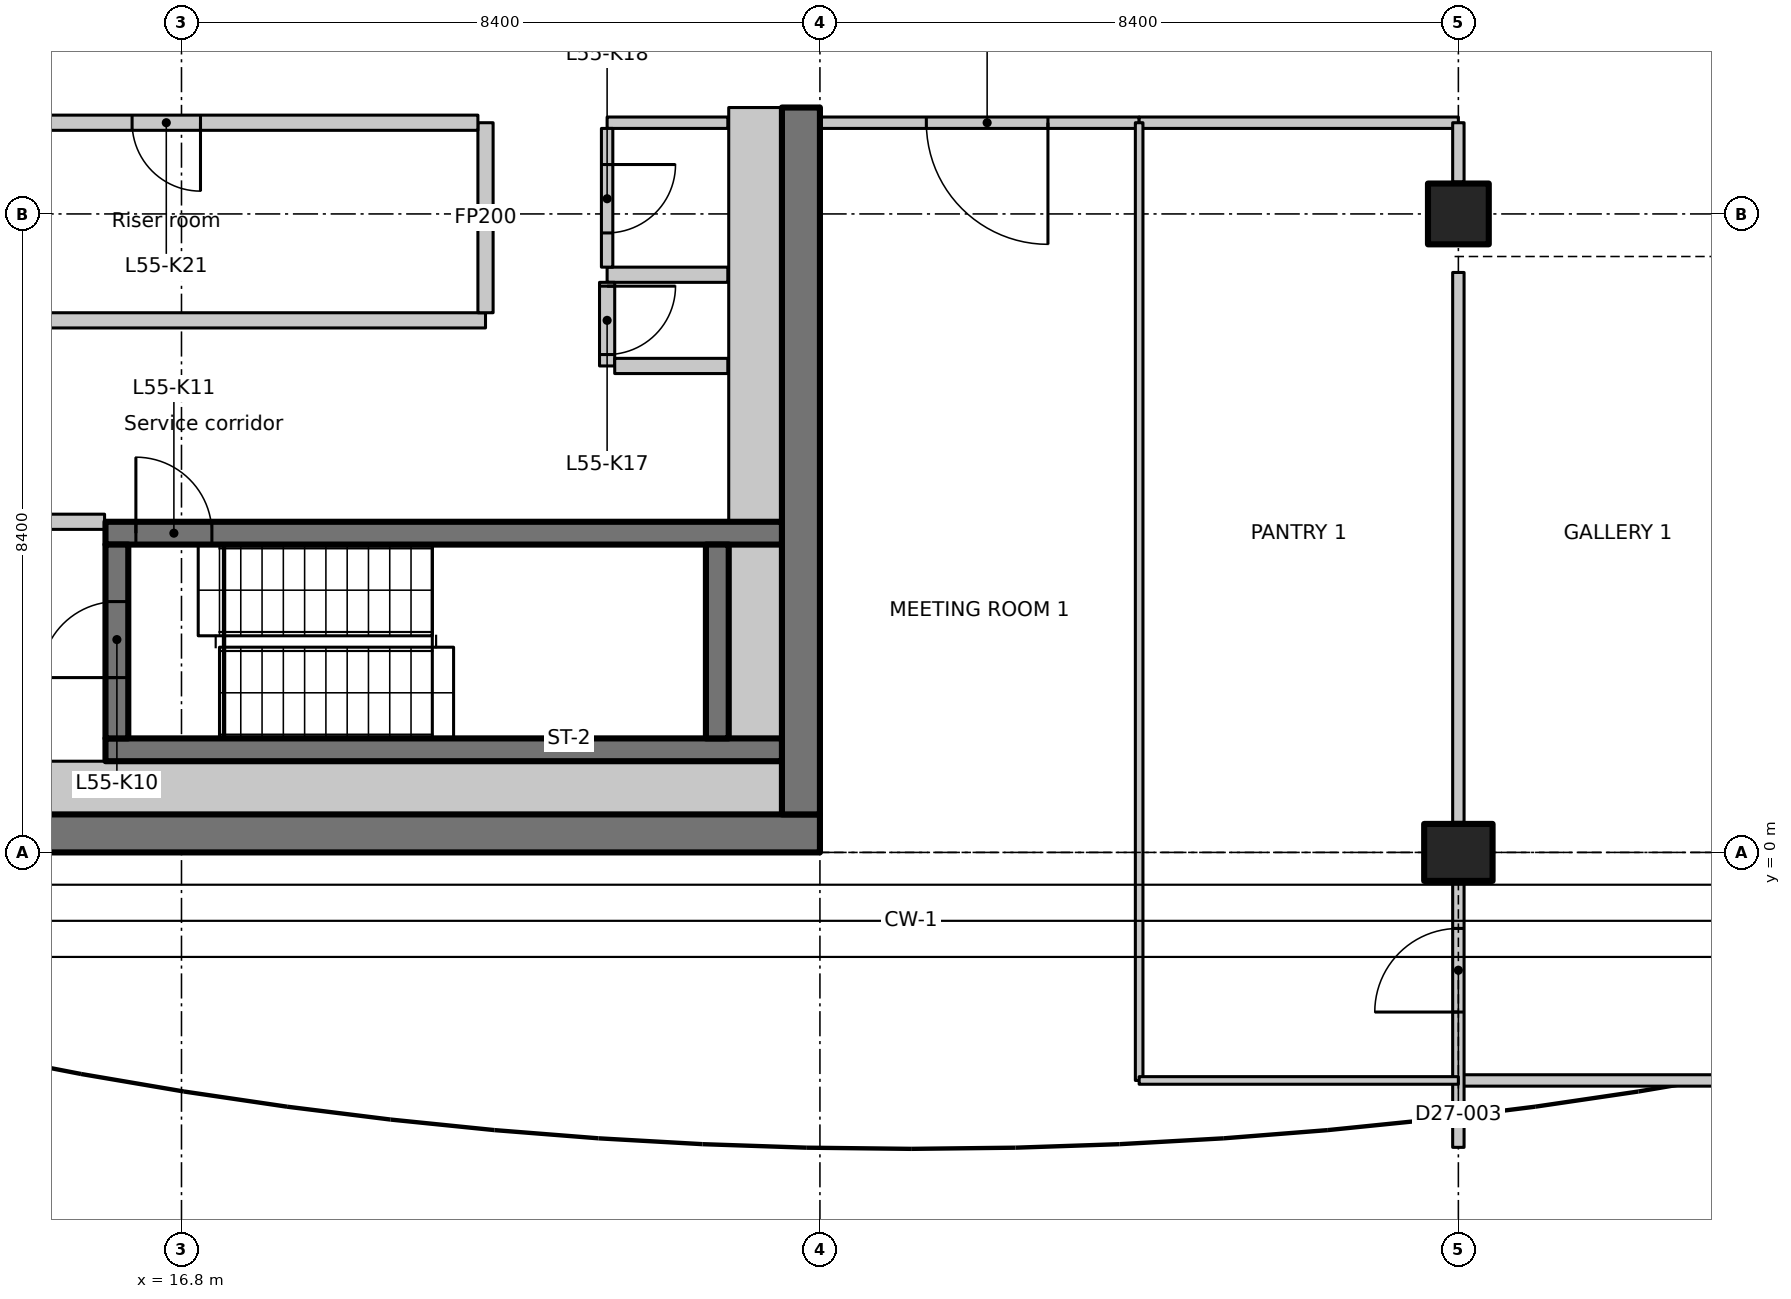
"""IFC4 building model, lengths in metres.
Left out: names, types, materials, properties, quantities, classifications, styles, units other than length and angle.
Written with IfcOpenShell. Run it as: python <this file> out.ifc"""

import sys

from ifc_helpers import new_model, si_unit, direction, frame, frame_2d, origin, origin_2d, place, context, subcontext, project, spatial, polyline, rectangle, outline, extrude, element, fill, save


model = new_model("IFC4")
c1 = context("Model", 3, precision=1e-05, world=origin(), true_north=direction((0.0, 1.0)))
c2 = subcontext(c1, "Body", "Model", "MODEL_VIEW")
j1 = project(units=[si_unit("LENGTHUNIT", "METRE"), si_unit("PLANEANGLEUNIT", "RADIAN")], contexts=[c1])
p1 = place(None, origin())
s1 = spatial("IfcSite", under=j1, at=p1, CompositionType="ELEMENT")
p2 = place(p1, origin())
s2 = spatial("IfcBuilding", under=s1, at=p2, CompositionType="ELEMENT")
p3 = place(p2, frame((0.0, 0.0, 219.3)))
s3 = spatial("IfcBuildingStorey", under=s2, at=p3, CompositionType="ELEMENT", Elevation=219.3)
p4 = place(p3, frame((33.6, 0.0, 0.0), z_axis=(0.0, 0.0, 1.0), x_axis=(0.0, 1.0, 0.0)))
e1 = element("IfcColumn", 1, at=p4, inside=s3, PredefinedType="COLUMN", context=c2, shape_type="SweptSolid", body=[
    extrude(rectangle(XDim=0.75, YDim=0.9, at=origin_2d()), origin(), (0.0, 0.0, 1.0), 3.35),
])
p5 = place(p3, frame((33.6, 8.4, 0.0), z_axis=(0.0, 0.0, 1.0), x_axis=(1.0, 0.0, 0.0)))
e2 = element("IfcColumn", 2, at=p5, inside=s3, PredefinedType="COLUMN", context=c2, shape_type="SweptSolid", body=[
    extrude(rectangle(XDim=0.8, YDim=0.8, at=origin_2d()), origin(), (0.0, 0.0, 1.0), 3.35),
])
p6 = place(p3, frame((7.436, 0.25, 0.0), z_axis=(0.0, 0.0, 1.0), x_axis=(1.0, 0.0, 0.0)))
e3 = element("IfcWall", 3, at=p6, inside=s3, PredefinedType="SHEAR", context=c2, shape_type="SweptSolid", body=[
    extrude(rectangle(XDim=17.764, YDim=0.5, at=frame_2d((8.882, 0.0))), origin(), (0.0, 0.0, 1.0), 3.35),
])
p7 = place(p3, frame((24.95, 0.5, 0.0), z_axis=(0.0, 0.0, 1.0), x_axis=(0.0, 1.0, 0.0)))
e4 = element("IfcWall", 4, at=p7, inside=s3, PredefinedType="SHEAR", context=c2, shape_type="SweptSolid", body=[
    extrude(rectangle(XDim=9.3, YDim=0.5, at=frame_2d((4.65, 0.0))), origin(), (0.0, 0.0, 1.0), 3.35),
])
p8 = place(p3, frame((15.8, 1.35, 0.0), z_axis=(0.0, 0.0, 1.0), x_axis=(1.0, 0.0, 0.0)))
e5 = element("IfcWall", 5, at=p8, inside=s3, PredefinedType="SHEAR", context=c2, shape_type="SweptSolid", body=[
    extrude(rectangle(XDim=8.9, YDim=0.3, at=frame_2d((4.45, 0.0))), origin(), (0.0, 0.0, 1.0), 3.35),
])
p9 = place(p3, frame((15.8, 4.2, 0.0), z_axis=(0.0, 0.0, 1.0), x_axis=(1.0, 0.0, 0.0)))
e6 = element("IfcWall", 6, at=p9, inside=s3, PredefinedType="SHEAR", context=c2, shape_type="SweptSolid", body=[
    extrude(rectangle(XDim=8.9, YDim=0.3, at=frame_2d((4.45, 0.0))), origin(), (0.0, 0.0, 1.0), 3.35),
])
p10 = place(p9, frame((0.4, 0.0, 0.0)))
e7 = element("IfcOpeningElement", 7, at=p10, cuts=e6, PredefinedType="OPENING", context=c2, shape_type="SweptSolid", body=[
    extrude(rectangle(XDim=1.0, YDim=2.1, at=frame_2d((0.5, 1.05))), frame((0.0, 0.16, 0.0), z_axis=(0.0, -1.0, 0.0), x_axis=(1.0, 0.0, 0.0)), (0.0, 0.0, 1.0), 0.32),
])
p11 = place(p3, frame((15.95, 1.5, 0.0), z_axis=(0.0, 0.0, 1.0), x_axis=(0.0, 1.0, 0.0)))
e8 = element("IfcWall", 8, at=p11, inside=s3, PredefinedType="SHEAR", context=c2, shape_type="SweptSolid", body=[
    extrude(rectangle(XDim=2.55, YDim=0.3, at=frame_2d((1.275, 0.0))), origin(), (0.0, 0.0, 1.0), 3.35),
])
p12 = place(p11, frame((0.8, 0.0, 0.0)))
e9 = element("IfcOpeningElement", 9, at=p12, cuts=e8, PredefinedType="OPENING", context=c2, shape_type="SweptSolid", body=[
    extrude(rectangle(XDim=1.0, YDim=2.1, at=frame_2d((0.5, 1.05))), frame((0.0, 0.16, 0.0), z_axis=(0.0, -1.0, 0.0), x_axis=(1.0, 0.0, 0.0)), (0.0, 0.0, 1.0), 0.32),
])
p13 = place(p3, frame((23.85, 1.5, 0.0), z_axis=(0.0, 0.0, 1.0), x_axis=(0.0, 1.0, 0.0)))
e10 = element("IfcWall", 10, at=p13, inside=s3, PredefinedType="SHEAR", context=c2, shape_type="SweptSolid", body=[
    extrude(rectangle(XDim=2.55, YDim=0.3, at=frame_2d((1.275, 0.0))), origin(), (0.0, 0.0, 1.0), 3.35),
])
p14 = place(p3, frame((13.362, 4.35, 0.0), z_axis=(0.0, 0.0, 1.0), x_axis=(1.0, 0.0, 0.0)))
e11 = element("IfcWall", 11, at=p14, inside=s3, PredefinedType="PARTITIONING", context=c2, shape_type="SweptSolid", body=[
    extrude(rectangle(XDim=2.426, YDim=0.2, at=frame_2d((1.213, 0.0))), origin(), (0.0, 0.0, 1.0), 3.35),
])
p15 = place(p14, frame((0.638, 0.0, 0.0)))
e12 = element("IfcOpeningElement", 12, at=p15, cuts=e11, PredefinedType="OPENING", context=c2, shape_type="SweptSolid", body=[
    extrude(rectangle(XDim=1.0, YDim=2.1, at=frame_2d((0.5, 1.05))), frame((0.0, 0.11, 0.0), z_axis=(0.0, -1.0, 0.0), x_axis=(1.0, 0.0, 0.0)), (0.0, 0.0, 1.0), 0.22),
])
p16 = place(p3, frame((12.4, 7.0, 0.0), z_axis=(0.0, 0.0, 1.0), x_axis=(1.0, 0.0, 0.0)))
e13 = element("IfcWall", 13, at=p16, inside=s3, PredefinedType="PARTITIONING", context=c2, shape_type="SweptSolid", body=[
    extrude(rectangle(XDim=8.4, YDim=0.2, at=frame_2d((4.2, 0.0))), origin(), (0.0, 0.0, 1.0), 3.35),
])
p17 = place(p3, frame((20.8, 7.1, 0.0), z_axis=(0.0, 0.0, 1.0), x_axis=(0.0, 1.0, 0.0)))
e14 = element("IfcWall", 14, at=p17, inside=s3, PredefinedType="PARTITIONING", context=c2, shape_type="SweptSolid", body=[
    extrude(rectangle(XDim=2.5, YDim=0.2, at=frame_2d((1.25, 0.0))), origin(), (0.0, 0.0, 1.0), 3.35),
])
p18 = place(p3, frame((20.7, 9.6, 0.0), z_axis=(0.0, 0.0, 1.0), x_axis=(-1.0, 0.0, 0.0)))
e15 = element("IfcWall", 15, at=p18, inside=s3, PredefinedType="PARTITIONING", context=c2, shape_type="SweptSolid", body=[
    extrude(rectangle(XDim=8.3, YDim=0.2, at=frame_2d((4.15, 0.0))), origin(), (0.0, 0.0, 1.0), 3.35),
])
p19 = place(p18, frame((3.65, 0.0, 0.0)))
e16 = element("IfcOpeningElement", 16, at=p19, cuts=e15, PredefinedType="OPENING", context=c2, shape_type="SweptSolid", body=[
    extrude(rectangle(XDim=0.9, YDim=2.1, at=frame_2d((0.45, 1.05))), frame((0.0, 0.11, 0.0), z_axis=(0.0, -1.0, 0.0), x_axis=(1.0, 0.0, 0.0)), (0.0, 0.0, 1.0), 0.22),
])
p20 = place(p3, frame((23.988, 7.6, 0.0), z_axis=(0.0, 0.0, 1.0), x_axis=(-1.0, 0.0, 0.0)))
e17 = element("IfcWall", 17, at=p20, inside=s3, PredefinedType="PARTITIONING", context=c2, shape_type="SweptSolid", body=[
    extrude(rectangle(XDim=1.588, YDim=0.2, at=frame_2d((0.794, 0.0))), origin(), (0.0, 0.0, 1.0), 3.35),
])
p21 = place(p3, frame((22.4, 7.5, 0.0), z_axis=(0.0, 0.0, 1.0), x_axis=(0.0, -1.0, 0.0)))
e18 = element("IfcWall", 18, at=p21, inside=s3, PredefinedType="PARTITIONING", context=c2, shape_type="SweptSolid", body=[
    extrude(rectangle(XDim=1.1, YDim=0.2, at=frame_2d((0.55, 0.0))), origin(), (0.0, 0.0, 1.0), 3.35),
])
p22 = place(p21, frame((0.05, 0.0, 0.0)))
e19 = element("IfcOpeningElement", 19, at=p22, cuts=e18, PredefinedType="OPENING", context=c2, shape_type="SweptSolid", body=[
    extrude(rectangle(XDim=0.9, YDim=2.1, at=frame_2d((0.45, 1.05))), frame((0.0, 0.11, 0.0), z_axis=(0.0, -1.0, 0.0), x_axis=(1.0, 0.0, 0.0)), (0.0, 0.0, 1.0), 0.22),
])
p23 = place(p3, frame((22.5, 6.4, 0.0), z_axis=(0.0, 0.0, 1.0), x_axis=(1.0, 0.0, 0.0)))
e20 = element("IfcWall", 20, at=p23, inside=s3, PredefinedType="PARTITIONING", context=c2, shape_type="SweptSolid", body=[
    extrude(rectangle(XDim=1.488, YDim=0.2, at=frame_2d((0.744, 0.0))), origin(), (0.0, 0.0, 1.0), 3.35),
])
p24 = place(p3, frame((23.988, 9.6, 0.0), z_axis=(0.0, 0.0, 1.0), x_axis=(-1.0, 0.0, 0.0)))
e21 = element("IfcWall", 21, at=p24, inside=s3, PredefinedType="PARTITIONING", context=c2, shape_type="SweptSolid", body=[
    extrude(rectangle(XDim=1.588, YDim=0.15, at=frame_2d((0.794, 0.0))), origin(), (0.0, 0.0, 1.0), 3.35),
])
p25 = place(p3, frame((22.4, 9.525, 0.0), z_axis=(0.0, 0.0, 1.0), x_axis=(0.0, -1.0, 0.0)))
e22 = element("IfcWall", 22, at=p25, inside=s3, PredefinedType="PARTITIONING", context=c2, shape_type="SweptSolid", body=[
    extrude(rectangle(XDim=1.825, YDim=0.15, at=frame_2d((0.913, 0.0))), origin(), (0.0, 0.0, 1.0), 3.35),
])
p26 = place(p25, frame((0.475, 0.0, 0.0)))
e23 = element("IfcOpeningElement", 23, at=p26, cuts=e22, PredefinedType="OPENING", context=c2, shape_type="SweptSolid", body=[
    extrude(rectangle(XDim=0.9, YDim=2.1, at=frame_2d((0.45, 1.05))), frame((0.0, 0.085, 0.0), z_axis=(0.0, -1.0, 0.0), x_axis=(1.0, 0.0, 0.0)), (0.0, 0.0, 1.0), 0.17),
])
p27 = place(p3, frame((13.35, 0.85, 0.0), z_axis=(0.0, 0.0, 1.0), x_axis=(1.0, 0.0, 0.0)))
e24 = element("IfcWall", 24, at=p27, inside=s3, PredefinedType="PARTITIONING", context=c2, shape_type="SweptSolid", body=[
    extrude(rectangle(XDim=11.35, YDim=0.7, at=frame_2d((5.675, 0.0))), origin(), (0.0, 0.0, 1.0), 3.35),
])
p28 = place(p3, frame((24.35, 1.5, 0.0), z_axis=(0.0, 0.0, 1.0), x_axis=(0.0, 1.0, 0.0)))
e25 = element("IfcWall", 25, at=p28, inside=s3, PredefinedType="PARTITIONING", context=c2, shape_type="SweptSolid", body=[
    extrude(rectangle(XDim=2.55, YDim=0.7, at=frame_2d((1.275, 0.0))), origin(), (0.0, 0.0, 1.0), 3.35),
])
p29 = place(p3, frame((24.35, 4.35, 0.0), z_axis=(0.0, 0.0, 1.0), x_axis=(0.0, 1.0, 0.0)))
e26 = element("IfcWall", 26, at=p29, inside=s3, PredefinedType="PARTITIONING", context=c2, shape_type="SweptSolid", body=[
    extrude(rectangle(XDim=5.45, YDim=0.7, at=frame_2d((2.725, 0.0))), origin(), (0.0, 0.0, 1.0), 3.35),
])
p30 = place(p3, frame((29.4, 9.6, 0.0), z_axis=(0.0, 0.0, 1.0), x_axis=(-1.0, 0.0, 0.0)))
e27 = element("IfcWall", 27, at=p30, inside=s3, PredefinedType="PARTITIONING", context=c2, shape_type="SweptSolid", body=[
    extrude(rectangle(XDim=4.2, YDim=0.15, at=frame_2d((2.1, 0.0))), origin(), (0.0, 0.0, 1.0), 3.33),
])
p31 = place(p30, frame((1.2, 0.0, 0.0)))
e28 = element("IfcOpeningElement", 28, at=p31, cuts=e27, PredefinedType="OPENING", context=c2, shape_type="SweptSolid", body=[
    extrude(rectangle(XDim=1.6, YDim=2.1, at=frame_2d((0.8, 1.05))), frame((0.0, 0.085, 0.0), z_axis=(0.0, -1.0, 0.0), x_axis=(1.0, 0.0, 0.0)), (0.0, 0.0, 1.0), 0.17),
])
p32 = place(p3, frame((33.6, 9.6, 0.0), z_axis=(0.0, 0.0, 1.0), x_axis=(-1.0, 0.0, 0.0)))
e29 = element("IfcWall", 29, at=p32, inside=s3, PredefinedType="PARTITIONING", context=c2, shape_type="SweptSolid", body=[
    extrude(rectangle(XDim=4.2, YDim=0.15, at=frame_2d((2.1, 0.0))), origin(), (0.0, 0.0, 1.0), 3.33),
])
p33 = place(p3, frame((37.59, -3.0, 0.0), z_axis=(0.0, 0.0, 1.0), x_axis=(-1.0, 0.0, 0.0)))
e30 = element("IfcWall", 30, at=p33, inside=s3, PredefinedType="PARTITIONING", context=c2, shape_type="SweptSolid", body=[
    extrude(rectangle(XDim=3.99, YDim=0.15, at=frame_2d((1.995, 0.0))), origin(), (0.0, 0.0, 1.0), 2.98),
])
p34 = place(p3, frame((33.6, -3.88, 0.0), z_axis=(0.0, 0.0, 1.0), x_axis=(0.0, 1.0, 0.0)))
e31 = element("IfcWall", 31, at=p34, inside=s3, PredefinedType="PARTITIONING", context=c2, shape_type="SweptSolid", body=[
    extrude(rectangle(XDim=3.485, YDim=0.15, at=frame_2d((1.743, 0.0))), origin(), (0.0, 0.0, 1.0), 2.98),
])
p35 = place(p34, frame((1.78, 0.0, 0.0)))
e32 = element("IfcOpeningElement", 32, at=p35, cuts=e31, PredefinedType="OPENING", context=c2, shape_type="SweptSolid", body=[
    extrude(rectangle(XDim=1.1, YDim=2.1, at=frame_2d((0.55, 1.05))), frame((0.0, 0.085, 0.0), z_axis=(0.0, -1.0, 0.0), x_axis=(1.0, 0.0, 0.0)), (0.0, 0.0, 1.0), 0.17),
])
p36 = place(p3, frame((33.6, 0.395, 0.0), z_axis=(0.0, 0.0, 1.0), x_axis=(0.0, 1.0, 0.0)))
e33 = element("IfcWall", 33, at=p36, inside=s3, PredefinedType="PARTITIONING", context=c2, shape_type="SweptSolid", body=[
    extrude(outline(polyline([(0.0, 0.0), (7.235, 0.0), (7.235, 3.33), (0.055, 3.33), (0.053, 2.98), (0.0, 2.98), (0.0, 0.0)])), frame((0.0, 0.075, 0.0), z_axis=(0.0, -1.0, 0.0), x_axis=(1.0, 0.0, 0.0)), (0.0, 0.0, 1.0), 0.15),
])
p37 = place(p3, frame((33.6, 8.82, 0.0), z_axis=(0.0, 0.0, 1.0), x_axis=(0.0, 1.0, 0.0)))
e34 = element("IfcWall", 34, at=p37, inside=s3, PredefinedType="PARTITIONING", context=c2, shape_type="SweptSolid", body=[
    extrude(rectangle(XDim=0.78, YDim=0.15, at=frame_2d((0.39, 0.0))), origin(), (0.0, 0.0, 1.0), 3.33),
])
p38 = place(p3, frame((29.4, 9.6, 0.0), z_axis=(0.0, 0.0, 1.0), x_axis=(0.0, -1.0, 0.0)))
e35 = element("IfcWall", 35, at=p38, inside=s3, PredefinedType="PARTITIONING", context=c2, shape_type="SweptSolid", body=[
    extrude(outline(polyline([(0.0, 0.0), (12.6, 0.0), (12.6, 3.33), (10.05, 3.33), (10.048, 2.98), (9.152, 2.98), (9.15, 3.33), (0.0, 3.33), (0.0, 0.0)])), frame((0.0, 0.05, 0.0), z_axis=(0.0, -1.0, 0.0), x_axis=(1.0, 0.0, 0.0)), (0.0, 0.0, 1.0), 0.1),
])
p39 = place(p3, frame((29.4, -3.0, 0.0), z_axis=(0.0, 0.0, 1.0), x_axis=(1.0, 0.0, 0.0)))
e36 = element("IfcWall", 36, at=p39, inside=s3, PredefinedType="PARTITIONING", context=c2, shape_type="SweptSolid", body=[
    extrude(rectangle(XDim=4.2, YDim=0.1, at=frame_2d((2.1, 0.0))), origin(), (0.0, 0.0, 1.0), 2.98),
])
p40 = place(p12, origin())
e37 = element("IfcDoor", 37, at=p40, inside=s3, OperationType="SINGLE_SWING_RIGHT", PredefinedType="DOOR", context=c2, shape_type="SweptSolid", body=[
    extrude(rectangle(XDim=1.0, YDim=2.1, at=frame_2d((0.5, 1.05))), frame((0.0, 0.025, 0.0), z_axis=(0.0, -1.0, 0.0), x_axis=(1.0, 0.0, 0.0)), (0.0, 0.0, 1.0), 0.05),
])
fill(e9, e37)
p41 = place(p10, origin())
e38 = element("IfcDoor", 38, at=p41, inside=s3, OperationType="SINGLE_SWING_LEFT", PredefinedType="DOOR", context=c2, shape_type="SweptSolid", body=[
    extrude(rectangle(XDim=1.0, YDim=2.1, at=frame_2d((0.5, 1.05))), frame((0.0, 0.025, 0.0), z_axis=(0.0, -1.0, 0.0), x_axis=(1.0, 0.0, 0.0)), (0.0, 0.0, 1.0), 0.05),
])
fill(e7, e38)
p42 = place(p22, origin())
e39 = element("IfcDoor", 39, at=p42, inside=s3, OperationType="SINGLE_SWING_LEFT", PredefinedType="DOOR", context=c2, shape_type="SweptSolid", body=[
    extrude(rectangle(XDim=0.9, YDim=2.1, at=frame_2d((0.45, 1.05))), frame((0.0, 0.025, 0.0), z_axis=(0.0, -1.0, 0.0), x_axis=(1.0, 0.0, 0.0)), (0.0, 0.0, 1.0), 0.05),
])
fill(e19, e39)
p43 = place(p26, origin())
e40 = element("IfcDoor", 40, at=p43, inside=s3, OperationType="SINGLE_SWING_RIGHT", PredefinedType="DOOR", context=c2, shape_type="SweptSolid", body=[
    extrude(rectangle(XDim=0.9, YDim=2.1, at=frame_2d((0.45, 1.05))), frame((0.0, 0.025, 0.0), z_axis=(0.0, -1.0, 0.0), x_axis=(1.0, 0.0, 0.0)), (0.0, 0.0, 1.0), 0.05),
])
fill(e23, e40)
p44 = place(p19, origin())
e41 = element("IfcDoor", 41, at=p44, inside=s3, OperationType="SINGLE_SWING_LEFT", PredefinedType="DOOR", context=c2, shape_type="SweptSolid", body=[
    extrude(rectangle(XDim=0.9, YDim=2.1, at=frame_2d((0.45, 1.05))), frame((0.0, 0.025, 0.0), z_axis=(0.0, -1.0, 0.0), x_axis=(1.0, 0.0, 0.0)), (0.0, 0.0, 1.0), 0.05),
])
fill(e16, e41)
p45 = place(p31, origin())
e42 = element("IfcDoor", 42, at=p45, inside=s3, OperationType="DOUBLE_DOOR_SINGLE_SWING", PredefinedType="DOOR", context=c2, shape_type="SweptSolid", body=[
    extrude(rectangle(XDim=1.6, YDim=2.1, at=frame_2d((0.8, 1.05))), frame((0.0, 0.025, 0.0), z_axis=(0.0, -1.0, 0.0), x_axis=(1.0, 0.0, 0.0)), (0.0, 0.0, 1.0), 0.05),
])
fill(e28, e42)
p46 = place(p35, origin())
e43 = element("IfcDoor", 43, at=p46, inside=s3, OperationType="SINGLE_SWING_LEFT", PredefinedType="DOOR", context=c2, shape_type="SweptSolid", body=[
    extrude(rectangle(XDim=1.1, YDim=2.1, at=frame_2d((0.55, 1.05))), frame((0.0, 0.025, 0.0), z_axis=(0.0, -1.0, 0.0), x_axis=(1.0, 0.0, 0.0)), (0.0, 0.0, 1.0), 0.05),
])
fill(e32, e43)
save(model, sys.argv[1])
